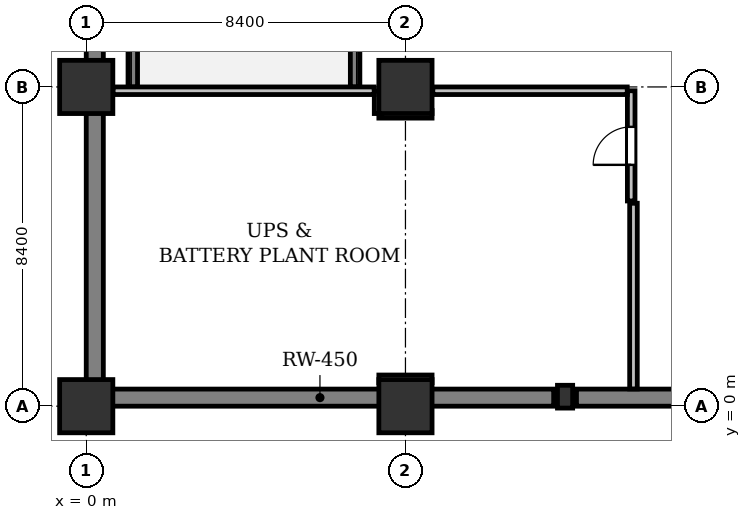
"""IFC4 building model, lengths in metres.
Left out: names, types, materials, properties, quantities, classifications, styles, units other than length and angle.
Written with IfcOpenShell. Run it as: python <this file> out.ifc"""

import sys

from ifc_helpers import new_model, si_unit, direction, frame, frame_2d, origin, origin_2d, place, context, subcontext, project, spatial, polyline, rectangle, outline, extrude, element, fill, save


model = new_model("IFC4")
c1 = context("Model", 3, precision=1e-05, world=origin(), true_north=direction((0.0, 1.0)))
c2 = subcontext(c1, "Body", "Model", "MODEL_VIEW")
j1 = project(units=[si_unit("LENGTHUNIT", "METRE"), si_unit("PLANEANGLEUNIT", "RADIAN")], contexts=[c1])
p1 = place(None, origin())
s1 = spatial("IfcSite", under=j1, at=p1, CompositionType="ELEMENT")
p2 = place(p1, origin())
s2 = spatial("IfcBuilding", under=s1, at=p2, CompositionType="ELEMENT")
p3 = place(p2, frame((0.0, 0.0, -4.8)))
s3 = spatial("IfcBuildingStorey", under=s2, at=p3, CompositionType="ELEMENT", Elevation=-4.8)
p4 = place(p3, frame((0.0, 0.225, 0.0), z_axis=(0.0, 0.0, 1.0), x_axis=(1.0, 0.0, 0.0)))
e1 = element("IfcWall", 1, at=p4, inside=s3, PredefinedType="SOLIDWALL", context=c2, shape_type="SweptSolid", body=[
    extrude(rectangle(XDim=12.3, YDim=0.45, at=frame_2d((6.15, 0.0))), origin(), (0.0, 0.0, 1.0), 4.48),
])
p5 = place(p3, frame((12.9, 0.225, 0.0), z_axis=(0.0, 0.0, 1.0), x_axis=(1.0, 0.0, 0.0)))
e2 = element("IfcWall", 2, at=p5, inside=s3, PredefinedType="SOLIDWALL", context=c2, shape_type="SweptSolid", body=[
    extrude(rectangle(XDim=7.8, YDim=0.45, at=frame_2d((3.9, 0.0))), origin(), (0.0, 0.0, 1.0), 4.48),
])
p6 = place(p3, frame((0.225, 0.45, 0.0), z_axis=(0.0, 0.0, 1.0), x_axis=(0.0, 1.0, 0.0)))
e3 = element("IfcWall", 3, at=p6, inside=s3, PredefinedType="SOLIDWALL", context=c2, shape_type="SweptSolid", body=[
    extrude(rectangle(XDim=49.5, YDim=0.45, at=frame_2d((24.75, 0.0))), origin(), (0.0, 0.0, 1.0), 4.48),
])
for number, where, z_axis, x_axis in (
    (4, (1.225, 8.4, 0.0), (0.0, 0.0, 1.0), (0.0, 1.0, 0.0)),
    (5, (7.075, 8.4, 0.0), (0.0, 0.0, 1.0), (0.0, 1.0, 0.0)),
):
    element("IfcWall", number, at=place(p3, frame(where, z_axis=z_axis, x_axis=x_axis)), inside=s3, PredefinedType="SHEAR", context=c2, shape_type="SweptSolid", body=[
        extrude(outline(polyline([(0.0, 0.0), (38.4, 0.0), (38.4, 4.5), (2.2, 0.05), (0.0, 0.05), (0.0, 0.0)])), frame((0.0, 0.125, 0.0), z_axis=(0.0, -1.0, 0.0), x_axis=(1.0, 0.0, 0.0)), (0.0, 0.0, 1.0), 0.25),
    ])
for number, where, z_axis, x_axis in (
    (6, (0.0, 0.0, 0.0), (0.0, 0.0, 1.0), (1.0, 0.0, 0.0)),
    (7, (0.0, 8.4, 0.0), (0.0, 0.0, 1.0), (1.0, 0.0, 0.0)),
    (8, (8.4, 0.0, 0.0), (0.0, 0.0, 1.0), (1.0, 0.0, 0.0)),
    (9, (8.4, 8.4, 0.0), (0.0, 0.0, 1.0), (1.0, 0.0, 0.0)),
):
    element("IfcColumn", number, at=place(p3, frame(where, z_axis=z_axis, x_axis=x_axis)), inside=s3, PredefinedType="COLUMN", context=c2, shape_type="SweptSolid", body=[
        extrude(rectangle(XDim=1.4, YDim=1.4, at=origin_2d()), origin(), (0.0, 0.0, 1.0), 4.8),
    ])
p7 = place(p3, frame((12.6, 0.25, 0.0), z_axis=(0.0, 0.0, 1.0), x_axis=(1.0, 0.0, 0.0)))
e10 = element("IfcColumn", 10, at=p7, inside=s3, PredefinedType="PILASTER", context=c2, shape_type="SweptSolid", body=[
    extrude(rectangle(XDim=0.4, YDim=0.6, at=origin_2d()), origin(), (0.0, 0.0, 1.0), 4.8),
])
p8 = place(p3, frame((7.7, 0.72, 0.0), z_axis=(0.0, 0.0, 1.0), x_axis=(1.0, 0.0, 0.0)))
e11 = element("IfcWall", 11, at=p8, inside=s3, PredefinedType="PARTITIONING", context=c2, shape_type="SweptSolid", body=[
    extrude(rectangle(XDim=1.4, YDim=0.2, at=frame_2d((0.7, 0.0))), origin(), (0.0, 0.0, 1.0), 3.868),
])
p9 = place(p3, frame((14.4, 0.454, 0.0), z_axis=(0.0, 0.0, 1.0), x_axis=(0.0, 1.0, 0.0)))
e12 = element("IfcWall", 12, at=p9, inside=s3, PredefinedType="PARTITIONING", context=c2, shape_type="SweptSolid", body=[
    extrude(rectangle(XDim=4.886, YDim=0.2, at=frame_2d((2.443, 0.0))), origin(), (0.0, 0.0, 1.0), 4.48),
])
p10 = place(p3, frame((14.34, 5.4, 0.0), z_axis=(0.0, 0.0, 1.0), x_axis=(0.0, 1.0, 0.0)))
e13 = element("IfcWall", 13, at=p10, inside=s3, PredefinedType="PARTITIONING", context=c2, shape_type="SweptSolid", body=[
    extrude(rectangle(XDim=2.9, YDim=0.2, at=frame_2d((1.45, 0.0))), origin(), (0.0, 0.0, 1.0), 3.78),
])
p11 = place(p10, frame((0.95, 0.0, 0.0)))
e14 = element("IfcOpeningElement", 14, at=p11, cuts=e13, PredefinedType="OPENING", context=c2, shape_type="SweptSolid", body=[
    extrude(rectangle(XDim=1.0, YDim=2.15, at=frame_2d((0.5, 1.075))), frame((0.0, 0.11, 0.0), z_axis=(0.0, -1.0, 0.0), x_axis=(1.0, 0.0, 0.0)), (0.0, 0.0, 1.0), 0.22),
])
p12 = place(p3, frame((14.236, 8.3, 0.0), z_axis=(0.0, 0.0, 1.0), x_axis=(-1.0, 0.0, 0.0)))
e15 = element("IfcWall", 15, at=p12, inside=s3, PredefinedType="PARTITIONING", context=c2, shape_type="SweptSolid", body=[
    extrude(rectangle(XDim=5.116, YDim=0.2, at=frame_2d((2.558, 0.0))), origin(), (0.0, 0.0, 1.0), 3.78),
])
p13 = place(p3, frame((9.1, 7.68, 0.0), z_axis=(0.0, 0.0, 1.0), x_axis=(-1.0, 0.0, 0.0)))
e16 = element("IfcWall", 16, at=p13, inside=s3, PredefinedType="PARTITIONING", context=c2, shape_type="SweptSolid", body=[
    extrude(rectangle(XDim=1.4, YDim=0.2, at=frame_2d((0.7, 0.0))), origin(), (0.0, 0.0, 1.0), 3.868),
])
p14 = place(p3, frame((7.68, 7.7, 0.0), z_axis=(0.0, 0.0, 1.0), x_axis=(0.0, 1.0, 0.0)))
e17 = element("IfcWall", 17, at=p14, inside=s3, PredefinedType="PARTITIONING", context=c2, shape_type="SweptSolid", body=[
    extrude(rectangle(XDim=0.6, YDim=0.2, at=frame_2d((0.3, 0.0))), origin(), (0.0, 0.0, 1.0), 4.48),
])
p15 = place(p3, frame((7.576, 8.3, 0.0), z_axis=(0.0, 0.0, 1.0), x_axis=(-1.0, 0.0, 0.0)))
e18 = element("IfcWall", 18, at=p15, inside=s3, PredefinedType="PARTITIONING", context=c2, shape_type="SweptSolid", body=[
    extrude(rectangle(XDim=6.871, YDim=0.2, at=frame_2d((3.436, 0.0))), origin(), (0.0, 0.0, 1.0), 4.48),
])
p16 = place(p11, origin())
e19 = element("IfcDoor", 19, at=p16, inside=s3, OperationType="SINGLE_SWING_LEFT", PredefinedType="DOOR", context=c2, shape_type="SweptSolid", body=[
    extrude(rectangle(XDim=1.0, YDim=2.15, at=frame_2d((0.5, 1.075))), frame((0.0, 0.025, 0.0), z_axis=(0.0, -1.0, 0.0), x_axis=(1.0, 0.0, 0.0)), (0.0, 0.0, 1.0), 0.05),
])
fill(e14, e19)
save(model, sys.argv[1])
